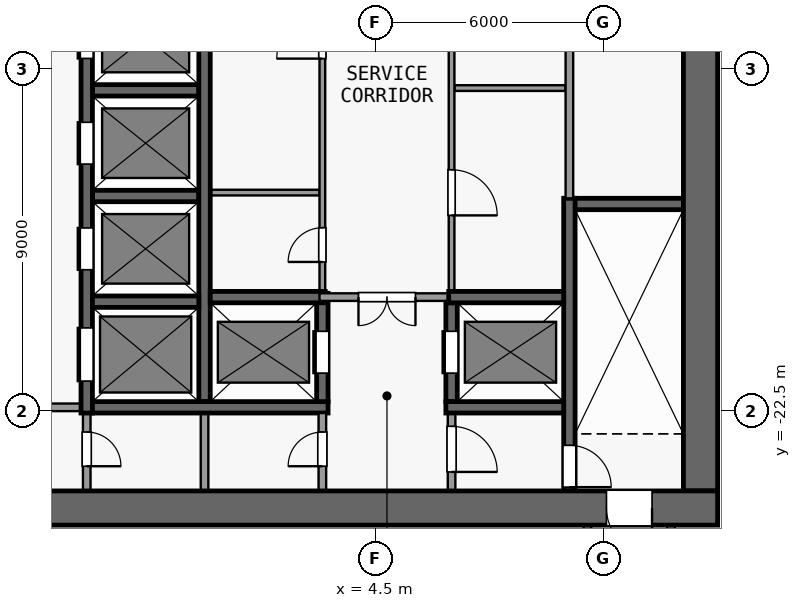
"""IFC4 building model, lengths in metres.
Left out: names, types, materials, properties, quantities, classifications, styles, units other than length and angle.
Written with IfcOpenShell. Run it as: python <this file> out.ifc"""

import sys

from ifc_helpers import new_model, si_unit, direction, frame, frame_2d, origin, place, context, subcontext, project, spatial, rectangle, extrude, element, fill, save


model = new_model("IFC4")
c1 = context("Model", 3, precision=1e-05, world=origin(), true_north=direction((0.0, 1.0)))
c2 = subcontext(c1, "Body", "Model", "MODEL_VIEW")
j1 = project(units=[si_unit("LENGTHUNIT", "METRE"), si_unit("PLANEANGLEUNIT", "RADIAN")], contexts=[c1])
p1 = place(None, origin())
s1 = spatial("IfcSite", under=j1, at=p1, CompositionType="ELEMENT")
p2 = place(p1, origin())
s2 = spatial("IfcBuilding", under=s1, at=p2, CompositionType="ELEMENT")
p3 = place(p2, origin())
s3 = spatial("IfcBuildingStorey", under=s2, at=p3, CompositionType="ELEMENT", Elevation=0.0)
p4 = place(p3, frame((13.5, -25.05, 0.0), z_axis=(0.0, 0.0, 1.0), x_axis=(-1.0, 0.0, 0.0)))
e1 = element("IfcWall", 1, at=p4, inside=s3, PredefinedType="SHEAR", context=c2, shape_type="SweptSolid", body=[
    extrude(rectangle(XDim=27.0, YDim=0.9, at=frame_2d((13.5, 0.0))), origin(), (0.0, 0.0, 1.0), 7.65),
])
p5 = place(p4, frame((24.075, 0.0, 0.0)))
e2 = element("IfcOpeningElement", 2, at=p5, cuts=e1, PredefinedType="OPENING", context=c2, shape_type="SweptSolid", body=[
    extrude(rectangle(XDim=1.2, YDim=2.1, at=frame_2d((0.6, 1.05))), frame((0.0, 0.46, 0.0), z_axis=(0.0, -1.0, 0.0), x_axis=(1.0, 0.0, 0.0)), (0.0, 0.0, 1.0), 0.92),
])
p6 = place(p4, frame((1.725, 0.0, 0.0)))
e3 = element("IfcOpeningElement", 3, at=p6, cuts=e1, PredefinedType="OPENING", context=c2, shape_type="SweptSolid", body=[
    extrude(rectangle(XDim=1.2, YDim=2.1, at=frame_2d((0.6, 1.05))), frame((0.0, 0.46, 0.0), z_axis=(0.0, -1.0, 0.0), x_axis=(1.0, 0.0, 0.0)), (0.0, 0.0, 1.0), 0.92),
])
p7 = place(p3, frame((13.05, -24.6, 0.0), z_axis=(0.0, 0.0, 1.0), x_axis=(0.0, 1.0, 0.0)))
e4 = element("IfcWall", 4, at=p7, inside=s3, PredefinedType="SHEAR", context=c2, shape_type="SweptSolid", body=[
    extrude(rectangle(XDim=16.1, YDim=0.9, at=frame_2d((8.05, 0.0))), origin(), (0.0, 0.0, 1.0), 7.65),
])
p8 = place(p3, frame((-3.25, -22.4, 0.0), z_axis=(0.0, 0.0, 1.0), x_axis=(-1.0, 0.0, 0.0)))
e5 = element("IfcWall", 5, at=p8, inside=s3, PredefinedType="PARTITIONING", context=c2, shape_type="SweptSolid", body=[
    extrude(rectangle(XDim=3.1, YDim=0.2, at=frame_2d((1.55, 0.0))), origin(), (0.0, 0.0, 1.0), 7.65),
])
p9 = place(p8, frame((0.8, 0.0, 0.0)))
e6 = element("IfcOpeningElement", 6, at=p9, cuts=e5, PredefinedType="OPENING", context=c2, shape_type="SweptSolid", body=[
    extrude(rectangle(XDim=1.5, YDim=2.1, at=frame_2d((0.75, 1.05))), frame((0.0, 0.11, 0.0), z_axis=(0.0, -1.0, 0.0), x_axis=(1.0, 0.0, 0.0)), (0.0, 0.0, 1.0), 0.22),
])
p10 = place(p3, frame((-2.95, -22.4, 0.0), z_axis=(0.0, 0.0, 1.0), x_axis=(1.0, 0.0, 0.0)))
e7 = element("IfcWall", 7, at=p10, inside=s3, PredefinedType="SHEAR", context=c2, shape_type="SweptSolid", body=[
    extrude(rectangle(XDim=6.2, YDim=0.3, at=frame_2d((3.1, 0.0))), origin(), (0.0, 0.0, 1.0), 7.65),
])
p11 = place(p3, frame((6.35, -22.4, 0.0), z_axis=(0.0, 0.0, 1.0), x_axis=(1.0, 0.0, 0.0)))
e8 = element("IfcWall", 8, at=p11, inside=s3, PredefinedType="SHEAR", context=c2, shape_type="SweptSolid", body=[
    extrude(rectangle(XDim=3.1, YDim=0.3, at=frame_2d((1.55, 0.0))), origin(), (0.0, 0.0, 1.0), 7.65),
])
p12 = place(p3, frame((-2.95, -19.62, 0.0), z_axis=(0.0, 0.0, 1.0), x_axis=(1.0, 0.0, 0.0)))
e9 = element("IfcWall", 9, at=p12, inside=s3, PredefinedType="SHEAR", context=c2, shape_type="SweptSolid", body=[
    extrude(rectangle(XDim=2.8, YDim=0.3, at=frame_2d((1.4, 0.0))), origin(), (0.0, 0.0, 1.0), 7.65),
])
p13 = place(p3, frame((0.15, -19.5, 0.0), z_axis=(0.0, 0.0, 1.0), x_axis=(1.0, 0.0, 0.0)))
e10 = element("IfcWall", 10, at=p13, inside=s3, PredefinedType="SHEAR", context=c2, shape_type="SweptSolid", body=[
    extrude(rectangle(XDim=3.025, YDim=0.3, at=frame_2d((1.513, 0.0))), origin(), (0.0, 0.0, 1.0), 7.65),
])
p14 = place(p3, frame((6.575, -19.5, 0.0), z_axis=(0.0, 0.0, 1.0), x_axis=(-1.0, 0.0, 0.0)))
e11 = element("IfcWall", 11, at=p14, inside=s3, PredefinedType="PARTITIONING", context=c2, shape_type="SweptSolid", body=[
    extrude(rectangle(XDim=3.55, YDim=0.2, at=frame_2d((1.775, 0.0))), origin(), (0.0, 0.0, 1.0), 7.65),
])
p15 = place(p14, frame((1.025, 0.0, 0.0)))
e12 = element("IfcOpeningElement", 12, at=p15, cuts=e11, PredefinedType="OPENING", context=c2, shape_type="SweptSolid", body=[
    extrude(rectangle(XDim=1.5, YDim=2.1, at=frame_2d((0.75, 1.05))), frame((0.0, 0.11, 0.0), z_axis=(0.0, -1.0, 0.0), x_axis=(1.0, 0.0, 0.0)), (0.0, 0.0, 1.0), 0.22),
])
p16 = place(p3, frame((6.425, -19.5, 0.0), z_axis=(0.0, 0.0, 1.0), x_axis=(1.0, 0.0, 0.0)))
e13 = element("IfcWall", 13, at=p16, inside=s3, PredefinedType="SHEAR", context=c2, shape_type="SweptSolid", body=[
    extrude(rectangle(XDim=3.025, YDim=0.3, at=frame_2d((1.512, 0.0))), origin(), (0.0, 0.0, 1.0), 7.65),
])
p17 = place(p3, frame((9.5, -17.05, 0.0), z_axis=(0.0, 0.0, 1.0), x_axis=(1.0, 0.0, 0.0)))
e14 = element("IfcWall", 14, at=p17, inside=s3, PredefinedType="SHEAR", context=c2, shape_type="SweptSolid", body=[
    extrude(rectangle(XDim=3.1, YDim=0.3, at=frame_2d((1.55, 0.0))), origin(), (0.0, 0.0, 1.0), 7.65),
])
p18 = place(p3, frame((-2.95, -16.84, 0.0), z_axis=(0.0, 0.0, 1.0), x_axis=(1.0, 0.0, 0.0)))
e15 = element("IfcWall", 15, at=p18, inside=s3, PredefinedType="SHEAR", context=c2, shape_type="SweptSolid", body=[
    extrude(rectangle(XDim=2.8, YDim=0.3, at=frame_2d((1.4, 0.0))), origin(), (0.0, 0.0, 1.0), 7.65),
])
p19 = place(p3, frame((0.15, -16.75, 0.0), z_axis=(0.0, 0.0, 1.0), x_axis=(1.0, 0.0, 0.0)))
e16 = element("IfcWall", 16, at=p19, inside=s3, PredefinedType="PARTITIONING", context=c2, shape_type="SweptSolid", body=[
    extrude(rectangle(XDim=2.875, YDim=0.15, at=frame_2d((1.438, 0.0))), origin(), (0.0, 0.0, 1.0), 7.65),
])
p20 = place(p3, frame((-2.95, -14.06, 0.0), z_axis=(0.0, 0.0, 1.0), x_axis=(1.0, 0.0, 0.0)))
e17 = element("IfcWall", 17, at=p20, inside=s3, PredefinedType="SHEAR", context=c2, shape_type="SweptSolid", body=[
    extrude(rectangle(XDim=2.8, YDim=0.3, at=frame_2d((1.4, 0.0))), origin(), (0.0, 0.0, 1.0), 7.65),
])
p21 = place(p3, frame((6.575, -14.0, 0.0), z_axis=(0.0, 0.0, 1.0), x_axis=(1.0, 0.0, 0.0)))
e18 = element("IfcWall", 18, at=p21, inside=s3, PredefinedType="PARTITIONING", context=c2, shape_type="SweptSolid", body=[
    extrude(rectangle(XDim=2.925, YDim=0.15, at=frame_2d((1.462, 0.0))), origin(), (0.0, 0.0, 1.0), 7.65),
])
p22 = place(p3, frame((-3.1, -22.55, 0.0), z_axis=(0.0, 0.0, 1.0), x_axis=(0.0, -1.0, 0.0)))
e19 = element("IfcWall", 19, at=p22, inside=s3, PredefinedType="PARTITIONING", context=c2, shape_type="SweptSolid", body=[
    extrude(rectangle(XDim=2.05, YDim=0.2, at=frame_2d((1.025, 0.0))), origin(), (0.0, 0.0, 1.0), 7.65),
])
p23 = place(p22, frame((0.5, 0.0, 0.0)))
e20 = element("IfcOpeningElement", 20, at=p23, cuts=e19, PredefinedType="OPENING", context=c2, shape_type="SweptSolid", body=[
    extrude(rectangle(XDim=0.9, YDim=2.1, at=frame_2d((0.45, 1.05))), frame((0.0, 0.11, 0.0), z_axis=(0.0, -1.0, 0.0), x_axis=(1.0, 0.0, 0.0)), (0.0, 0.0, 1.0), 0.22),
])
p24 = place(p3, frame((-3.1, -22.55, 0.0), z_axis=(0.0, 0.0, 1.0), x_axis=(0.0, 1.0, 0.0)))
e21 = element("IfcWall", 21, at=p24, inside=s3, PredefinedType="SHEAR", context=c2, shape_type="SweptSolid", body=[
    extrude(rectangle(XDim=14.05, YDim=0.3, at=frame_2d((7.025, 0.0))), origin(), (0.0, 0.0, 1.0), 7.65),
])
p25 = place(p24, frame((12.11, 0.0, 0.0)))
e22 = element("IfcOpeningElement", 22, at=p25, cuts=e21, PredefinedType="OPENING", context=c2, shape_type="SweptSolid", body=[
    extrude(rectangle(XDim=1.1, YDim=2.1, at=frame_2d((0.55, 1.05))), frame((0.0, 0.16, 0.0), z_axis=(0.0, -1.0, 0.0), x_axis=(1.0, 0.0, 0.0)), (0.0, 0.0, 1.0), 0.32),
])
p26 = place(p24, frame((3.77, 0.0, 0.0)))
e23 = element("IfcOpeningElement", 23, at=p26, cuts=e21, PredefinedType="OPENING", context=c2, shape_type="SweptSolid", body=[
    extrude(rectangle(XDim=1.1, YDim=2.1, at=frame_2d((0.55, 1.05))), frame((0.0, 0.16, 0.0), z_axis=(0.0, -1.0, 0.0), x_axis=(1.0, 0.0, 0.0)), (0.0, 0.0, 1.0), 0.32),
])
p27 = place(p24, frame((6.55, 0.0, 0.0)))
e24 = element("IfcOpeningElement", 24, at=p27, cuts=e21, PredefinedType="OPENING", context=c2, shape_type="SweptSolid", body=[
    extrude(rectangle(XDim=1.1, YDim=2.1, at=frame_2d((0.55, 1.05))), frame((0.0, 0.16, 0.0), z_axis=(0.0, -1.0, 0.0), x_axis=(1.0, 0.0, 0.0)), (0.0, 0.0, 1.0), 0.32),
])
p28 = place(p24, frame((9.33, 0.0, 0.0)))
e25 = element("IfcOpeningElement", 25, at=p28, cuts=e21, PredefinedType="OPENING", context=c2, shape_type="SweptSolid", body=[
    extrude(rectangle(XDim=1.1, YDim=2.1, at=frame_2d((0.55, 1.05))), frame((0.0, 0.16, 0.0), z_axis=(0.0, -1.0, 0.0), x_axis=(1.0, 0.0, 0.0)), (0.0, 0.0, 1.0), 0.32),
])
p29 = place(p24, frame((0.84, 0.0, 0.0)))
e26 = element("IfcOpeningElement", 26, at=p29, cuts=e21, PredefinedType="OPENING", context=c2, shape_type="SweptSolid", body=[
    extrude(rectangle(XDim=1.4, YDim=2.1, at=frame_2d((0.7, 1.05))), frame((0.0, 0.16, 0.0), z_axis=(0.0, -1.0, 0.0), x_axis=(1.0, 0.0, 0.0)), (0.0, 0.0, 1.0), 0.32),
])
p30 = place(p3, frame((0.0, -24.6, 0.0), z_axis=(0.0, 0.0, 1.0), x_axis=(0.0, 1.0, 0.0)))
e27 = element("IfcWall", 27, at=p30, inside=s3, PredefinedType="PARTITIONING", context=c2, shape_type="SweptSolid", body=[
    extrude(rectangle(XDim=2.05, YDim=0.2, at=frame_2d((1.025, 0.0))), origin(), (0.0, 0.0, 1.0), 7.65),
])
p31 = place(p3, frame((0.0, -22.25, 0.0), z_axis=(0.0, 0.0, 1.0), x_axis=(0.0, 1.0, 0.0)))
e28 = element("IfcWall", 28, at=p31, inside=s3, PredefinedType="SHEAR", context=c2, shape_type="SweptSolid", body=[
    extrude(rectangle(XDim=13.75, YDim=0.3, at=frame_2d((6.875, 0.0))), origin(), (0.0, 0.0, 1.0), 7.65),
])
p32 = place(p3, frame((3.1, -24.6, 0.0), z_axis=(0.0, 0.0, 1.0), x_axis=(0.0, 1.0, 0.0)))
e29 = element("IfcWall", 29, at=p32, inside=s3, PredefinedType="PARTITIONING", context=c2, shape_type="SweptSolid", body=[
    extrude(rectangle(XDim=2.05, YDim=0.2, at=frame_2d((1.025, 0.0))), origin(), (0.0, 0.0, 1.0), 7.65),
])
p33 = place(p32, frame((0.65, 0.0, 0.0)))
e30 = element("IfcOpeningElement", 30, at=p33, cuts=e29, PredefinedType="OPENING", context=c2, shape_type="SweptSolid", body=[
    extrude(rectangle(XDim=0.9, YDim=2.1, at=frame_2d((0.45, 1.05))), frame((0.0, 0.11, 0.0), z_axis=(0.0, -1.0, 0.0), x_axis=(1.0, 0.0, 0.0)), (0.0, 0.0, 1.0), 0.22),
])
p34 = place(p3, frame((3.1, -22.25, 0.0), z_axis=(0.0, 0.0, 1.0), x_axis=(0.0, 1.0, 0.0)))
e31 = element("IfcWall", 31, at=p34, inside=s3, PredefinedType="SHEAR", context=c2, shape_type="SweptSolid", body=[
    extrude(rectangle(XDim=2.85, YDim=0.3, at=frame_2d((1.425, 0.0))), origin(), (0.0, 0.0, 1.0), 7.65),
])
p35 = place(p34, frame((0.75, 0.0, 0.0)))
e32 = element("IfcOpeningElement", 32, at=p35, cuts=e31, PredefinedType="OPENING", context=c2, shape_type="SweptSolid", body=[
    extrude(rectangle(XDim=1.1, YDim=2.1, at=frame_2d((0.55, 1.05))), frame((0.0, 0.16, 0.0), z_axis=(0.0, -1.0, 0.0), x_axis=(1.0, 0.0, 0.0)), (0.0, 0.0, 1.0), 0.32),
])
p36 = place(p3, frame((3.1, -19.4, 0.0), z_axis=(0.0, 0.0, 1.0), x_axis=(0.0, 1.0, 0.0)))
e33 = element("IfcWall", 33, at=p36, inside=s3, PredefinedType="PARTITIONING", context=c2, shape_type="SweptSolid", body=[
    extrude(rectangle(XDim=10.9, YDim=0.15, at=frame_2d((5.45, 0.0))), origin(), (0.0, 0.0, 1.0), 7.65),
])
p37 = place(p36, frame((0.825, 0.0, 0.0)))
e34 = element("IfcOpeningElement", 34, at=p37, cuts=e33, PredefinedType="OPENING", context=c2, shape_type="SweptSolid", body=[
    extrude(rectangle(XDim=0.9, YDim=2.1, at=frame_2d((0.45, 1.05))), frame((0.0, 0.085, 0.0), z_axis=(0.0, -1.0, 0.0), x_axis=(1.0, 0.0, 0.0)), (0.0, 0.0, 1.0), 0.17),
])
p38 = place(p36, frame((6.175, 0.0, 0.0)))
e35 = element("IfcOpeningElement", 35, at=p38, cuts=e33, PredefinedType="OPENING", context=c2, shape_type="SweptSolid", body=[
    extrude(rectangle(XDim=1.2, YDim=2.1, at=frame_2d((0.6, 1.05))), frame((0.0, 0.085, 0.0), z_axis=(0.0, -1.0, 0.0), x_axis=(1.0, 0.0, 0.0)), (0.0, 0.0, 1.0), 0.17),
])
p39 = place(p3, frame((6.5, -22.55, 0.0), z_axis=(0.0, 0.0, 1.0), x_axis=(0.0, -1.0, 0.0)))
e36 = element("IfcWall", 36, at=p39, inside=s3, PredefinedType="PARTITIONING", context=c2, shape_type="SweptSolid", body=[
    extrude(rectangle(XDim=2.05, YDim=0.2, at=frame_2d((1.025, 0.0))), origin(), (0.0, 0.0, 1.0), 7.65),
])
p40 = place(p39, frame((0.35, 0.0, 0.0)))
e37 = element("IfcOpeningElement", 37, at=p40, cuts=e36, PredefinedType="OPENING", context=c2, shape_type="SweptSolid", body=[
    extrude(rectangle(XDim=1.2, YDim=2.1, at=frame_2d((0.6, 1.05))), frame((0.0, 0.11, 0.0), z_axis=(0.0, -1.0, 0.0), x_axis=(1.0, 0.0, 0.0)), (0.0, 0.0, 1.0), 0.22),
])
p41 = place(p3, frame((6.5, -22.25, 0.0), z_axis=(0.0, 0.0, 1.0), x_axis=(0.0, 1.0, 0.0)))
e38 = element("IfcWall", 38, at=p41, inside=s3, PredefinedType="SHEAR", context=c2, shape_type="SweptSolid", body=[
    extrude(rectangle(XDim=2.6, YDim=0.3, at=frame_2d((1.3, 0.0))), origin(), (0.0, 0.0, 1.0), 7.65),
])
p42 = place(p41, frame((0.75, 0.0, 0.0)))
e39 = element("IfcOpeningElement", 39, at=p42, cuts=e38, PredefinedType="OPENING", context=c2, shape_type="SweptSolid", body=[
    extrude(rectangle(XDim=1.1, YDim=2.1, at=frame_2d((0.55, 1.05))), frame((0.0, 0.16, 0.0), z_axis=(0.0, -1.0, 0.0), x_axis=(1.0, 0.0, 0.0)), (0.0, 0.0, 1.0), 0.32),
])
p43 = place(p3, frame((6.5, -8.5, 0.0), z_axis=(0.0, 0.0, 1.0), x_axis=(0.0, -1.0, 0.0)))
e40 = element("IfcWall", 40, at=p43, inside=s3, PredefinedType="PARTITIONING", context=c2, shape_type="SweptSolid", body=[
    extrude(rectangle(XDim=10.85, YDim=0.15, at=frame_2d((5.425, 0.0))), origin(), (0.0, 0.0, 1.0), 7.65),
])
p44 = place(p43, frame((7.65, 0.0, 0.0)))
e41 = element("IfcOpeningElement", 41, at=p44, cuts=e40, PredefinedType="OPENING", context=c2, shape_type="SweptSolid", body=[
    extrude(rectangle(XDim=1.2, YDim=2.1, at=frame_2d((0.6, 1.05))), frame((0.0, 0.085, 0.0), z_axis=(0.0, -1.0, 0.0), x_axis=(1.0, 0.0, 0.0)), (0.0, 0.0, 1.0), 0.17),
])
p45 = place(p43, frame((2.15, 0.0, 0.0)))
e42 = element("IfcOpeningElement", 42, at=p45, cuts=e40, PredefinedType="OPENING", context=c2, shape_type="SweptSolid", body=[
    extrude(rectangle(XDim=1.2, YDim=2.1, at=frame_2d((0.6, 1.05))), frame((0.0, 0.085, 0.0), z_axis=(0.0, -1.0, 0.0), x_axis=(1.0, 0.0, 0.0)), (0.0, 0.0, 1.0), 0.17),
])
p46 = place(p3, frame((9.6, -16.9, 0.0), z_axis=(0.0, 0.0, 1.0), x_axis=(0.0, -1.0, 0.0)))
e43 = element("IfcWall", 43, at=p46, inside=s3, PredefinedType="SHEAR", context=c2, shape_type="SweptSolid", body=[
    extrude(rectangle(XDim=7.7, YDim=0.3, at=frame_2d((3.85, 0.0))), origin(), (0.0, 0.0, 1.0), 7.65),
])
p47 = place(p46, frame((6.5, 0.0, 0.0)))
e44 = element("IfcOpeningElement", 44, at=p47, cuts=e43, PredefinedType="OPENING", context=c2, shape_type="SweptSolid", body=[
    extrude(rectangle(XDim=1.1, YDim=2.1, at=frame_2d((0.55, 1.05))), frame((0.0, 0.16, 0.0), z_axis=(0.0, -1.0, 0.0), x_axis=(1.0, 0.0, 0.0)), (0.0, 0.0, 1.0), 0.32),
])
p48 = place(p3, frame((9.6, -16.9, 0.0), z_axis=(0.0, 0.0, 1.0), x_axis=(0.0, 1.0, 0.0)))
e45 = element("IfcWall", 45, at=p48, inside=s3, PredefinedType="PARTITIONING", context=c2, shape_type="SweptSolid", body=[
    extrude(rectangle(XDim=8.4, YDim=0.2, at=frame_2d((4.2, 0.0))), origin(), (0.0, 0.0, 1.0), 7.65),
])
p49 = place(p3, frame((10.075, -25.5, 0.0), z_axis=(0.0, 0.0, 1.0), x_axis=(0.0, -1.0, 0.0)))
e46 = element("IfcWall", 46, at=p49, inside=s3, PredefinedType="PARTITIONING", context=c2, shape_type="SweptSolid", body=[
    extrude(rectangle(XDim=8.85, YDim=0.2, at=frame_2d((4.425, 0.0))), origin(), (0.0, 0.0, 1.0), 7.65),
])
p50 = place(p49, frame((7.0, 0.0, 0.0)))
e47 = element("IfcOpeningElement", 47, at=p50, cuts=e46, PredefinedType="OPENING", context=c2, shape_type="SweptSolid", body=[
    extrude(rectangle(XDim=1.0, YDim=2.1, at=frame_2d((0.5, 1.05))), frame((0.0, 0.11, 0.0), z_axis=(0.0, -1.0, 0.0), x_axis=(1.0, 0.0, 0.0)), (0.0, 0.0, 1.0), 0.22),
])
p51 = place(p3, frame((12.275, -34.35, 0.0), z_axis=(0.0, 0.0, 1.0), x_axis=(0.0, 1.0, 0.0)))
e48 = element("IfcWall", 48, at=p51, inside=s3, PredefinedType="PARTITIONING", context=c2, shape_type="SweptSolid", body=[
    extrude(rectangle(XDim=8.85, YDim=0.2, at=frame_2d((4.425, 0.0))), origin(), (0.0, 0.0, 1.0), 7.65),
])
p52 = place(p51, frame((0.85, 0.0, 0.0)))
e49 = element("IfcOpeningElement", 49, at=p52, cuts=e48, PredefinedType="OPENING", context=c2, shape_type="SweptSolid", body=[
    extrude(rectangle(XDim=1.0, YDim=2.1, at=frame_2d((0.5, 1.05))), frame((0.0, 0.11, 0.0), z_axis=(0.0, -1.0, 0.0), x_axis=(1.0, 0.0, 0.0)), (0.0, 0.0, 1.0), 0.22),
])
p53 = place(p35, origin())
e50 = element("IfcDoor", 50, at=p53, inside=s3, OperationType="DOUBLE_DOOR_SLIDING", PredefinedType="DOOR", context=c2, shape_type="SweptSolid", body=[
    extrude(rectangle(XDim=1.1, YDim=2.1, at=frame_2d((0.55, 1.05))), frame((0.0, 0.025, 0.0), z_axis=(0.0, -1.0, 0.0), x_axis=(1.0, 0.0, 0.0)), (0.0, 0.0, 1.0), 0.05),
])
fill(e32, e50)
p54 = place(p42, origin())
e51 = element("IfcDoor", 51, at=p54, inside=s3, OperationType="DOUBLE_DOOR_SLIDING", PredefinedType="DOOR", context=c2, shape_type="SweptSolid", body=[
    extrude(rectangle(XDim=1.1, YDim=2.1, at=frame_2d((0.55, 1.05))), frame((0.0, 0.025, 0.0), z_axis=(0.0, -1.0, 0.0), x_axis=(1.0, 0.0, 0.0)), (0.0, 0.0, 1.0), 0.05),
])
fill(e39, e51)
p55 = place(p26, origin())
e52 = element("IfcDoor", 52, at=p55, inside=s3, OperationType="DOUBLE_DOOR_SLIDING", PredefinedType="DOOR", context=c2, shape_type="SweptSolid", body=[
    extrude(rectangle(XDim=1.1, YDim=2.1, at=frame_2d((0.55, 1.05))), frame((0.0, 0.025, 0.0), z_axis=(0.0, -1.0, 0.0), x_axis=(1.0, 0.0, 0.0)), (0.0, 0.0, 1.0), 0.05),
])
fill(e23, e52)
p56 = place(p27, origin())
e53 = element("IfcDoor", 53, at=p56, inside=s3, OperationType="DOUBLE_DOOR_SLIDING", PredefinedType="DOOR", context=c2, shape_type="SweptSolid", body=[
    extrude(rectangle(XDim=1.1, YDim=2.1, at=frame_2d((0.55, 1.05))), frame((0.0, 0.025, 0.0), z_axis=(0.0, -1.0, 0.0), x_axis=(1.0, 0.0, 0.0)), (0.0, 0.0, 1.0), 0.05),
])
fill(e24, e53)
p57 = place(p28, origin())
e54 = element("IfcDoor", 54, at=p57, inside=s3, OperationType="DOUBLE_DOOR_SLIDING", PredefinedType="DOOR", context=c2, shape_type="SweptSolid", body=[
    extrude(rectangle(XDim=1.1, YDim=2.1, at=frame_2d((0.55, 1.05))), frame((0.0, 0.025, 0.0), z_axis=(0.0, -1.0, 0.0), x_axis=(1.0, 0.0, 0.0)), (0.0, 0.0, 1.0), 0.05),
])
fill(e25, e54)
p58 = place(p29, origin())
e55 = element("IfcDoor", 55, at=p58, inside=s3, OperationType="DOUBLE_DOOR_SLIDING", PredefinedType="DOOR", context=c2, shape_type="SweptSolid", body=[
    extrude(rectangle(XDim=1.4, YDim=2.1, at=frame_2d((0.7, 1.05))), frame((0.0, 0.025, 0.0), z_axis=(0.0, -1.0, 0.0), x_axis=(1.0, 0.0, 0.0)), (0.0, 0.0, 1.0), 0.05),
])
fill(e26, e55)
p59 = place(p6, origin())
e56 = element("IfcDoor", 56, at=p59, inside=s3, OperationType="SINGLE_SWING_LEFT", PredefinedType="DOOR", context=c2, shape_type="SweptSolid", body=[
    extrude(rectangle(XDim=1.2, YDim=2.1, at=frame_2d((0.6, 1.05))), frame((0.0, 0.025, 0.0), z_axis=(0.0, -1.0, 0.0), x_axis=(1.0, 0.0, 0.0)), (0.0, 0.0, 1.0), 0.05),
])
fill(e3, e56)
p60 = place(p40, origin())
e57 = element("IfcDoor", 57, at=p60, inside=s3, OperationType="SINGLE_SWING_RIGHT", PredefinedType="DOOR", context=c2, shape_type="SweptSolid", body=[
    extrude(rectangle(XDim=1.2, YDim=2.1, at=frame_2d((0.6, 1.05))), frame((0.0, 0.025, 0.0), z_axis=(0.0, -1.0, 0.0), x_axis=(1.0, 0.0, 0.0)), (0.0, 0.0, 1.0), 0.05),
])
fill(e37, e57)
p61 = place(p15, origin())
e58 = element("IfcDoor", 58, at=p61, inside=s3, OperationType="DOUBLE_DOOR_SINGLE_SWING", PredefinedType="DOOR", context=c2, shape_type="SweptSolid", body=[
    extrude(rectangle(XDim=1.5, YDim=2.1, at=frame_2d((0.75, 1.05))), frame((0.0, 0.025, 0.0), z_axis=(0.0, -1.0, 0.0), x_axis=(1.0, 0.0, 0.0)), (0.0, 0.0, 1.0), 0.05),
])
fill(e12, e58)
p62 = place(p33, origin())
e59 = element("IfcDoor", 59, at=p62, inside=s3, OperationType="SINGLE_SWING_LEFT", PredefinedType="DOOR", context=c2, shape_type="SweptSolid", body=[
    extrude(rectangle(XDim=0.9, YDim=2.1, at=frame_2d((0.45, 1.05))), frame((0.0, 0.025, 0.0), z_axis=(0.0, -1.0, 0.0), x_axis=(1.0, 0.0, 0.0)), (0.0, 0.0, 1.0), 0.05),
])
fill(e30, e59)
p63 = place(p23, origin())
e60 = element("IfcDoor", 60, at=p63, inside=s3, OperationType="SINGLE_SWING_RIGHT", PredefinedType="DOOR", context=c2, shape_type="SweptSolid", body=[
    extrude(rectangle(XDim=0.9, YDim=2.1, at=frame_2d((0.45, 1.05))), frame((0.0, 0.025, 0.0), z_axis=(0.0, -1.0, 0.0), x_axis=(1.0, 0.0, 0.0)), (0.0, 0.0, 1.0), 0.05),
])
fill(e20, e60)
p64 = place(p37, origin())
e61 = element("IfcDoor", 61, at=p64, inside=s3, OperationType="SINGLE_SWING_LEFT", PredefinedType="DOOR", context=c2, shape_type="SweptSolid", body=[
    extrude(rectangle(XDim=0.9, YDim=2.1, at=frame_2d((0.45, 1.05))), frame((0.0, 0.025, 0.0), z_axis=(0.0, -1.0, 0.0), x_axis=(1.0, 0.0, 0.0)), (0.0, 0.0, 1.0), 0.05),
])
fill(e34, e61)
p65 = place(p38, origin())
e62 = element("IfcDoor", 62, at=p65, inside=s3, OperationType="SINGLE_SWING_LEFT", PredefinedType="DOOR", context=c2, shape_type="SweptSolid", body=[
    extrude(rectangle(XDim=1.2, YDim=2.1, at=frame_2d((0.6, 1.05))), frame((0.0, 0.025, 0.0), z_axis=(0.0, -1.0, 0.0), x_axis=(1.0, 0.0, 0.0)), (0.0, 0.0, 1.0), 0.05),
])
fill(e35, e62)
p66 = place(p44, origin())
e63 = element("IfcDoor", 63, at=p66, inside=s3, OperationType="SINGLE_SWING_RIGHT", PredefinedType="DOOR", context=c2, shape_type="SweptSolid", body=[
    extrude(rectangle(XDim=1.2, YDim=2.1, at=frame_2d((0.6, 1.05))), frame((0.0, 0.025, 0.0), z_axis=(0.0, -1.0, 0.0), x_axis=(1.0, 0.0, 0.0)), (0.0, 0.0, 1.0), 0.05),
])
fill(e41, e63)
p67 = place(p47, origin())
e64 = element("IfcDoor", 64, at=p67, inside=s3, OperationType="SINGLE_SWING_RIGHT", PredefinedType="DOOR", context=c2, shape_type="SweptSolid", body=[
    extrude(rectangle(XDim=1.1, YDim=2.1, at=frame_2d((0.55, 1.05))), frame((0.0, 0.025, 0.0), z_axis=(0.0, -1.0, 0.0), x_axis=(1.0, 0.0, 0.0)), (0.0, 0.0, 1.0), 0.05),
])
fill(e44, e64)
save(model, sys.argv[1])
